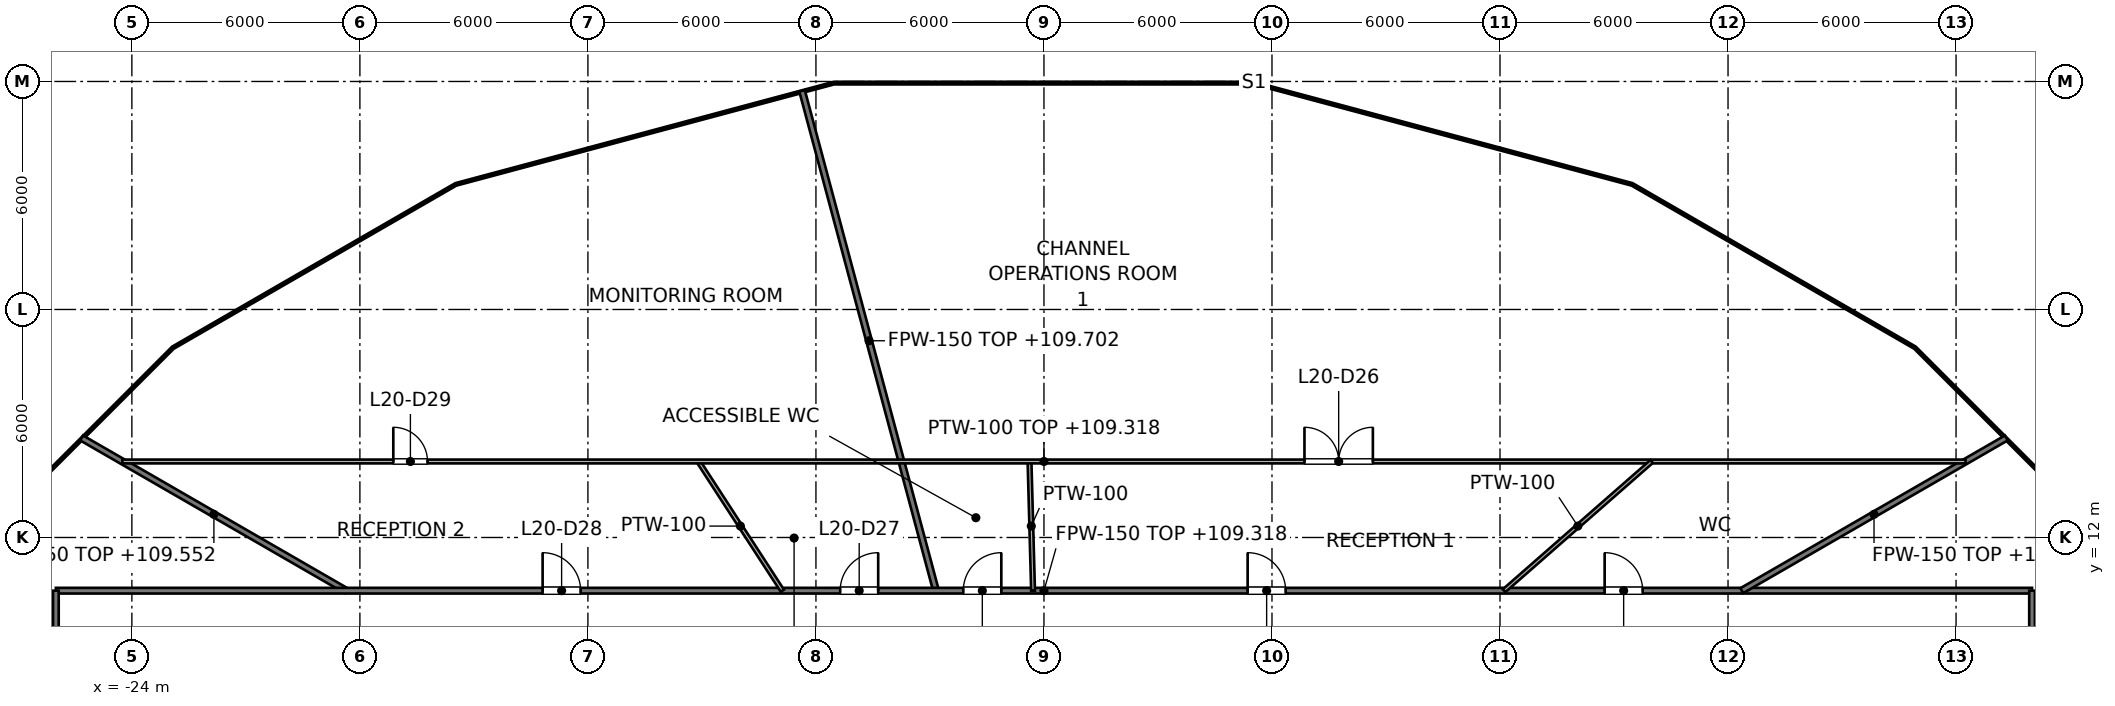
"""IFC4 building model, lengths in metres.
Left out: names, types, materials, properties, quantities, classifications, styles, units other than length and angle.
Written with IfcOpenShell. Run it as: python <this file> out.ifc"""

import sys

from ifc_helpers import new_model, si_unit, direction, frame, frame_2d, origin, place, context, subcontext, project, spatial, rectangle, extrude, element, fill, save


model = new_model("IFC4")
c1 = context("Model", 3, precision=1e-05, world=origin(), true_north=direction((0.0, 1.0)))
c2 = subcontext(c1, "Body", "Model", "MODEL_VIEW")
j1 = project(units=[si_unit("LENGTHUNIT", "METRE"), si_unit("PLANEANGLEUNIT", "RADIAN")], contexts=[c1])
p1 = place(None, origin())
s1 = spatial("IfcSite", under=j1, at=p1, CompositionType="ELEMENT")
p2 = place(p1, origin())
s2 = spatial("IfcBuilding", under=s1, at=p2, CompositionType="ELEMENT")
p3 = place(p2, frame((0.0, 0.0, 106.2)))
s3 = spatial("IfcBuildingStorey", under=s2, at=p3, CompositionType="ELEMENT", Elevation=106.2)
p4 = place(p3, frame((-6.365, 23.754, 0.0), z_axis=(0.0, 0.0, 1.0), x_axis=(0.258843021616, -0.965919401483, 0.0)))
e1 = element("IfcWall", 1, at=p4, inside=s3, PredefinedType="PARTITIONING", context=c2, shape_type="SweptSolid", body=[
    extrude(rectangle(XDim=13.618, YDim=0.15, at=frame_2d((6.809, 0.0))), origin(), (0.0, 0.0, 1.0), 3.502),
])
p5 = place(p3, frame((-25.322, 14.619, 0.0), z_axis=(0.0, 0.0, 1.0), x_axis=(0.866017655369, -0.500013420409, 0.0)))
e2 = element("IfcWall", 2, at=p5, inside=s3, PredefinedType="PARTITIONING", context=c2, shape_type="SweptSolid", body=[
    extrude(rectangle(XDim=8.038, YDim=0.15, at=frame_2d((4.019, 0.0))), origin(), (0.0, 0.0, 1.0), 3.352),
])
p6 = place(p3, frame((-26.0, 10.6, 0.0), z_axis=(0.0, 0.0, 1.0), x_axis=(1.0, 0.0, 0.0)))
e3 = element("IfcWall", 3, at=p6, inside=s3, PredefinedType="PARTITIONING", context=c2, shape_type="SweptSolid", body=[
    extrude(rectangle(XDim=52.0, YDim=0.15, at=frame_2d((26.0, 0.0))), origin(), (0.0, 0.0, 1.0), 3.118),
])
p7 = place(p6, frame((40.753, 0.0, 0.0)))
e4 = element("IfcOpeningElement", 4, at=p7, cuts=e3, PredefinedType="OPENING", context=c2, shape_type="SweptSolid", body=[
    extrude(rectangle(XDim=1.0, YDim=2.1, at=frame_2d((0.5, 1.05))), frame((0.0, 0.075, 0.0), z_axis=(0.0, -1.0, 0.0), x_axis=(1.0, 0.0, 0.0)), (0.0, 0.0, 1.0), 0.15),
])
p8 = place(p6, frame((31.36, 0.0, 0.0)))
e5 = element("IfcOpeningElement", 5, at=p8, cuts=e3, PredefinedType="OPENING", context=c2, shape_type="SweptSolid", body=[
    extrude(rectangle(XDim=1.0, YDim=2.1, at=frame_2d((0.5, 1.05))), frame((0.0, 0.075, 0.0), z_axis=(0.0, -1.0, 0.0), x_axis=(1.0, 0.0, 0.0)), (0.0, 0.0, 1.0), 0.15),
])
p9 = place(p6, frame((23.878, 0.0, 0.0)))
e6 = element("IfcOpeningElement", 6, at=p9, cuts=e3, PredefinedType="OPENING", context=c2, shape_type="SweptSolid", body=[
    extrude(rectangle(XDim=1.0, YDim=2.1, at=frame_2d((0.5, 1.05))), frame((0.0, 0.075, 0.0), z_axis=(0.0, -1.0, 0.0), x_axis=(1.0, 0.0, 0.0)), (0.0, 0.0, 1.0), 0.15),
])
p10 = place(p6, frame((20.638, 0.0, 0.0)))
e7 = element("IfcOpeningElement", 7, at=p10, cuts=e3, PredefinedType="OPENING", context=c2, shape_type="SweptSolid", body=[
    extrude(rectangle(XDim=1.0, YDim=2.1, at=frame_2d((0.5, 1.05))), frame((0.0, 0.075, 0.0), z_axis=(0.0, -1.0, 0.0), x_axis=(1.0, 0.0, 0.0)), (0.0, 0.0, 1.0), 0.15),
])
p11 = place(p6, frame((12.808, 0.0, 0.0)))
e8 = element("IfcOpeningElement", 8, at=p11, cuts=e3, PredefinedType="OPENING", context=c2, shape_type="SweptSolid", body=[
    extrude(rectangle(XDim=1.0, YDim=2.1, at=frame_2d((0.5, 1.05))), frame((0.0, 0.075, 0.0), z_axis=(0.0, -1.0, 0.0), x_axis=(1.0, 0.0, 0.0)), (0.0, 0.0, 1.0), 0.15),
])
p12 = place(p3, frame((18.361, 10.6, 0.0), z_axis=(0.0, 0.0, 1.0), x_axis=(0.866017655369, 0.500013420409, 0.0)))
e9 = element("IfcWall", 9, at=p12, inside=s3, PredefinedType="PARTITIONING", context=c2, shape_type="SweptSolid", body=[
    extrude(rectangle(XDim=8.038, YDim=0.15, at=frame_2d((4.019, 0.0))), origin(), (0.0, 0.0, 1.0), 3.352),
])
for number, where, z_axis, x_axis in (
    (10, (26.0, 7.8, 0.0), (0.0, 0.0, 1.0), (0.0, 1.0, 0.0)),
    (11, (-26.0, 7.8, 0.0), (0.0, 0.0, 1.0), (0.0, 1.0, 0.0)),
):
    element("IfcWall", number, at=place(p3, frame(where, z_axis=z_axis, x_axis=x_axis)), inside=s3, PredefinedType="PARTITIONING", context=c2, shape_type="SweptSolid", body=[
        extrude(rectangle(XDim=2.8, YDim=0.15, at=frame_2d((1.4, 0.0))), origin(), (0.0, 0.0, 1.0), 3.276),
    ])
p13 = place(p3, frame((-0.38, 14.0, 0.0), z_axis=(0.0, 0.0, 1.0), x_axis=(0.027276935786, -0.999627915163, 0.0)))
e12 = element("IfcWall", 12, at=p13, inside=s3, PredefinedType="PARTITIONING", context=c2, shape_type="SweptSolid", body=[
    extrude(rectangle(XDim=3.401, YDim=0.1, at=frame_2d((1.701, 0.0))), origin(), (0.0, 0.0, 1.0), 4.05),
])
p14 = place(p3, frame((-9.092, 14.0, 0.0), z_axis=(0.0, 0.0, 1.0), x_axis=(0.54465385443, -0.838660943918, 0.0)))
e13 = element("IfcWall", 13, at=p14, inside=s3, PredefinedType="PARTITIONING", context=c2, shape_type="SweptSolid", body=[
    extrude(rectangle(XDim=4.054, YDim=0.1, at=frame_2d((2.027, 0.0))), origin(), (0.0, 0.0, 1.0), 4.05),
])
p15 = place(p3, frame((-24.25, 14.0, 0.0), z_axis=(0.0, 0.0, 1.0), x_axis=(1.0, 0.0, 0.0)))
e14 = element("IfcWall", 14, at=p15, inside=s3, PredefinedType="PARTITIONING", context=c2, shape_type="SweptSolid", body=[
    extrude(rectangle(XDim=48.5, YDim=0.1, at=frame_2d((24.25, 0.0))), origin(), (0.0, 0.0, 1.0), 3.118),
])
p16 = place(p15, frame((31.105, 0.0, 0.0)))
e15 = element("IfcOpeningElement", 15, at=p16, cuts=e14, PredefinedType="OPENING", context=c2, shape_type="SweptSolid", body=[
    extrude(rectangle(XDim=1.8, YDim=2.1, at=frame_2d((0.9, 1.05))), frame((0.0, 0.05, 0.0), z_axis=(0.0, -1.0, 0.0), x_axis=(1.0, 0.0, 0.0)), (0.0, 0.0, 1.0), 0.1),
])
p17 = place(p15, frame((7.129, 0.0, 0.0)))
e16 = element("IfcOpeningElement", 16, at=p17, cuts=e14, PredefinedType="OPENING", context=c2, shape_type="SweptSolid", body=[
    extrude(rectangle(XDim=0.9, YDim=2.1, at=frame_2d((0.45, 1.05))), frame((0.0, 0.05, 0.0), z_axis=(0.0, -1.0, 0.0), x_axis=(1.0, 0.0, 0.0)), (0.0, 0.0, 1.0), 0.1),
])
p18 = place(p3, frame((12.107, 10.6, 0.0), z_axis=(0.0, 0.0, 1.0), x_axis=(0.752362742548, 0.658749044497, 0.0)))
e17 = element("IfcWall", 17, at=p18, inside=s3, PredefinedType="PARTITIONING", context=c2, shape_type="SweptSolid", body=[
    extrude(rectangle(XDim=5.161, YDim=0.1, at=frame_2d((2.581, 0.0))), origin(), (0.0, 0.0, 1.0), 4.05),
])
p19 = place(p7, origin())
e18 = element("IfcDoor", 18, at=p19, inside=s3, OperationType="SINGLE_SWING_LEFT", PredefinedType="DOOR", context=c2, shape_type="SweptSolid", body=[
    extrude(rectangle(XDim=1.0, YDim=2.1, at=frame_2d((0.5, 1.05))), frame((0.0, 0.025, 0.0), z_axis=(0.0, -1.0, 0.0), x_axis=(1.0, 0.0, 0.0)), (0.0, 0.0, 1.0), 0.05),
])
fill(e4, e18)
p20 = place(p8, origin())
e19 = element("IfcDoor", 19, at=p20, inside=s3, OperationType="SINGLE_SWING_LEFT", PredefinedType="DOOR", context=c2, shape_type="SweptSolid", body=[
    extrude(rectangle(XDim=1.0, YDim=2.1, at=frame_2d((0.5, 1.05))), frame((0.0, 0.025, 0.0), z_axis=(0.0, -1.0, 0.0), x_axis=(1.0, 0.0, 0.0)), (0.0, 0.0, 1.0), 0.05),
])
fill(e5, e19)
p21 = place(p9, origin())
e20 = element("IfcDoor", 20, at=p21, inside=s3, OperationType="SINGLE_SWING_RIGHT", PredefinedType="DOOR", context=c2, shape_type="SweptSolid", body=[
    extrude(rectangle(XDim=1.0, YDim=2.1, at=frame_2d((0.5, 1.05))), frame((0.0, 0.025, 0.0), z_axis=(0.0, -1.0, 0.0), x_axis=(1.0, 0.0, 0.0)), (0.0, 0.0, 1.0), 0.05),
])
fill(e6, e20)
p22 = place(p16, origin())
e21 = element("IfcDoor", 21, at=p22, inside=s3, OperationType="DOUBLE_DOOR_SINGLE_SWING", PredefinedType="DOOR", context=c2, shape_type="SweptSolid", body=[
    extrude(rectangle(XDim=1.8, YDim=2.1, at=frame_2d((0.9, 1.05))), frame((0.0, 0.025, 0.0), z_axis=(0.0, -1.0, 0.0), x_axis=(1.0, 0.0, 0.0)), (0.0, 0.0, 1.0), 0.05),
])
fill(e15, e21)
p23 = place(p10, origin())
e22 = element("IfcDoor", 22, at=p23, inside=s3, OperationType="SINGLE_SWING_RIGHT", PredefinedType="DOOR", context=c2, shape_type="SweptSolid", body=[
    extrude(rectangle(XDim=1.0, YDim=2.1, at=frame_2d((0.5, 1.05))), frame((0.0, 0.025, 0.0), z_axis=(0.0, -1.0, 0.0), x_axis=(1.0, 0.0, 0.0)), (0.0, 0.0, 1.0), 0.05),
])
fill(e7, e22)
p24 = place(p11, origin())
e23 = element("IfcDoor", 23, at=p24, inside=s3, OperationType="SINGLE_SWING_LEFT", PredefinedType="DOOR", context=c2, shape_type="SweptSolid", body=[
    extrude(rectangle(XDim=1.0, YDim=2.1, at=frame_2d((0.5, 1.05))), frame((0.0, 0.025, 0.0), z_axis=(0.0, -1.0, 0.0), x_axis=(1.0, 0.0, 0.0)), (0.0, 0.0, 1.0), 0.05),
])
fill(e8, e23)
p25 = place(p17, origin())
e24 = element("IfcDoor", 24, at=p25, inside=s3, OperationType="SINGLE_SWING_LEFT", PredefinedType="DOOR", context=c2, shape_type="SweptSolid", body=[
    extrude(rectangle(XDim=0.9, YDim=2.1, at=frame_2d((0.45, 1.05))), frame((0.0, 0.025, 0.0), z_axis=(0.0, -1.0, 0.0), x_axis=(1.0, 0.0, 0.0)), (0.0, 0.0, 1.0), 0.05),
])
fill(e16, e24)
save(model, sys.argv[1])
